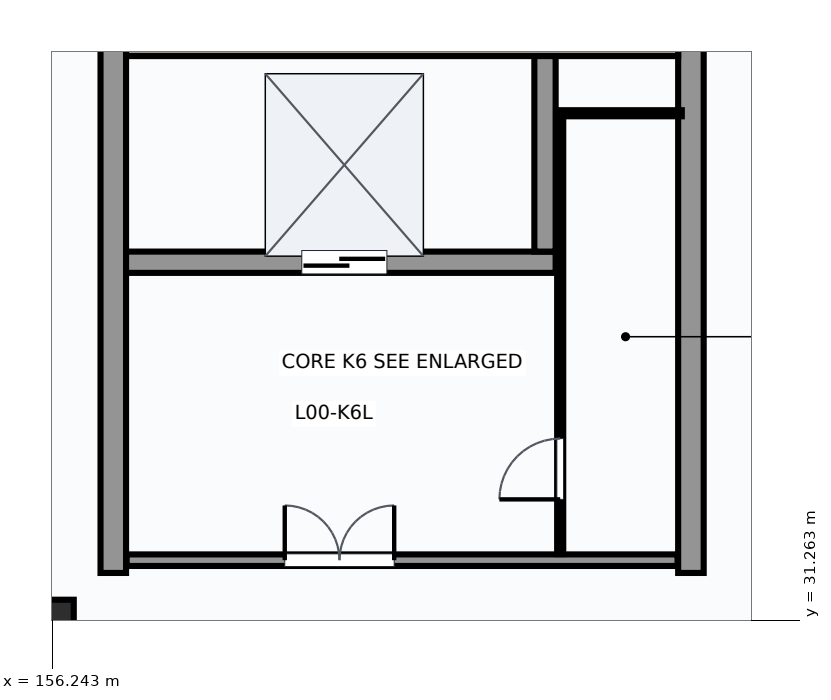
"""IFC4 building model, lengths in metres.
Left out: names, types, materials, properties, quantities, classifications, styles, units other than length and angle.
Written with IfcOpenShell. Run it as: python <this file> out.ifc"""

import sys

from ifc_helpers import new_model, si_unit, direction, frame, frame_2d, origin, origin_2d, place, context, subcontext, project, spatial, rectangle, extrude, element, fill, save


model = new_model("IFC4")
c1 = context("Model", 3, precision=1e-05, world=origin(), true_north=direction((0.0, 1.0)))
c2 = subcontext(c1, "Body", "Model", "MODEL_VIEW")
j1 = project(units=[si_unit("LENGTHUNIT", "METRE"), si_unit("PLANEANGLEUNIT", "RADIAN")], contexts=[c1])
p1 = place(None, origin())
s1 = spatial("IfcSite", under=j1, at=p1, CompositionType="ELEMENT")
p2 = place(p1, origin())
s2 = spatial("IfcBuilding", under=s1, at=p2, CompositionType="ELEMENT")
p3 = place(p2, origin())
s3 = spatial("IfcBuildingStorey", under=s2, at=p3, CompositionType="ELEMENT", Elevation=0.0)
p4 = place(p3, frame((156.0, 31.0, 0.0), z_axis=(0.0, 0.0, 1.0), x_axis=(1.0, 0.0, 0.0)))
e1 = element("IfcColumn", 1, at=p4, inside=s3, PredefinedType="COLUMN", context=c2, shape_type="SweptSolid", body=[
    extrude(rectangle(XDim=1.2, YDim=1.2, at=origin_2d()), origin(), (0.0, 0.0, 1.0), 5.4),
])
for number, where, z_axis, x_axis in (
    (2, (157.25, 32.04, 0.0), (0.0, 0.0, 1.0), (0.0, 1.0, 0.0)),
    (3, (166.75, 32.04, 0.0), (0.0, 0.0, 1.0), (0.0, 1.0, 0.0)),
):
    element("IfcWall", number, at=place(p3, frame(where, z_axis=z_axis, x_axis=x_axis)), inside=s3, PredefinedType="SHEAR", context=c2, shape_type="SweptSolid", body=[
        extrude(rectangle(XDim=8.92, YDim=0.42, at=frame_2d((4.46, 0.0))), origin(), (0.0, 0.0, 1.0), 5.4),
    ])
p5 = place(p3, frame((157.46, 40.75, 0.0), z_axis=(0.0, 0.0, 1.0), x_axis=(1.0, 0.0, 0.0)))
e4 = element("IfcWall", 4, at=p5, inside=s3, PredefinedType="SHEAR", context=c2, shape_type="SweptSolid", body=[
    extrude(rectangle(XDim=9.08, YDim=0.42, at=frame_2d((4.54, 0.0))), origin(), (0.0, 0.0, 1.0), 5.4),
])
p6 = place(p3, frame((157.46, 37.15, 0.0), z_axis=(0.0, 0.0, 1.0), x_axis=(1.0, 0.0, 0.0)))
e5 = element("IfcWall", 5, at=p6, inside=s3, PredefinedType="SHEAR", context=c2, shape_type="SweptSolid", body=[
    extrude(rectangle(XDim=7.065, YDim=0.35, at=frame_2d((3.532, 0.0))), origin(), (0.0, 0.0, 1.0), 5.4),
])
p7 = place(p6, frame((2.89, 0.0, 0.0)))
e6 = element("IfcOpeningElement", 6, at=p7, cuts=e5, PredefinedType="OPENING", context=c2, shape_type="SweptSolid", body=[
    extrude(rectangle(XDim=1.4, YDim=2.3, at=frame_2d((0.7, 1.15))), frame((0.0, 0.185, 0.0), z_axis=(0.0, -1.0, 0.0), x_axis=(1.0, 0.0, 0.0)), (0.0, 0.0, 1.0), 0.37),
])
p8 = place(p3, frame((164.35, 37.325, 0.0), z_axis=(0.0, 0.0, 1.0), x_axis=(0.0, 1.0, 0.0)))
e7 = element("IfcWall", 7, at=p8, inside=s3, PredefinedType="SHEAR", context=c2, shape_type="SweptSolid", body=[
    extrude(rectangle(XDim=3.215, YDim=0.35, at=frame_2d((1.607, 0.0))), origin(), (0.0, 0.0, 1.0), 5.4),
])
p9 = place(p3, frame((157.47, 32.25, 0.0), z_axis=(0.0, 0.0, 1.0), x_axis=(1.0, 0.0, 0.0)))
e8 = element("IfcWall", 8, at=p9, inside=s3, PredefinedType="PARTITIONING", context=c2, shape_type="SweptSolid", body=[
    extrude(rectangle(XDim=9.06, YDim=0.19, at=frame_2d((4.53, 0.0))), origin(), (0.0, 0.0, 1.0), 5.06),
])
p10 = place(p9, frame((2.6, 0.0, 0.0)))
e9 = element("IfcOpeningElement", 9, at=p10, cuts=e8, PredefinedType="OPENING", context=c2, shape_type="SweptSolid", body=[
    extrude(rectangle(XDim=1.8, YDim=2.3, at=frame_2d((0.9, 1.15))), frame((0.0, 0.105, 0.0), z_axis=(0.0, -1.0, 0.0), x_axis=(1.0, 0.0, 0.0)), (0.0, 0.0, 1.0), 0.21),
])
p11 = place(p3, frame((164.6, 32.35, 0.0), z_axis=(0.0, 0.0, 1.0), x_axis=(0.0, 1.0, 0.0)))
e10 = element("IfcWall", 10, at=p11, inside=s3, PredefinedType="PARTITIONING", context=c2, shape_type="SweptSolid", body=[
    extrude(rectangle(XDim=7.25, YDim=0.1, at=frame_2d((3.625, 0.0))), origin(), (0.0, 0.0, 1.0), 5.06),
])
p12 = place(p11, frame((0.9, 0.0, 0.0)))
e11 = element("IfcOpeningElement", 11, at=p12, cuts=e10, PredefinedType="OPENING", context=c2, shape_type="SweptSolid", body=[
    extrude(rectangle(XDim=1.0, YDim=2.1, at=frame_2d((0.5, 1.05))), frame((0.0, 0.06, 0.0), z_axis=(0.0, -1.0, 0.0), x_axis=(1.0, 0.0, 0.0)), (0.0, 0.0, 1.0), 0.12),
])
p13 = place(p3, frame((164.6, 39.6, 0.0), z_axis=(0.0, 0.0, 1.0), x_axis=(1.0, 0.0, 0.0)))
e12 = element("IfcWall", 12, at=p13, inside=s3, PredefinedType="PARTITIONING", context=c2, shape_type="SweptSolid", body=[
    extrude(rectangle(XDim=2.0, YDim=0.1, at=frame_2d((1.0, 0.0))), origin(), (0.0, 0.0, 1.0), 5.06),
])
p14 = place(p7, origin())
e13 = element("IfcDoor", 13, at=p14, inside=s3, OperationType="SLIDING_TO_LEFT", PredefinedType="DOOR", context=c2, shape_type="SweptSolid", body=[
    extrude(rectangle(XDim=1.4, YDim=2.3, at=frame_2d((0.7, 1.15))), frame((0.0, 0.025, 0.0), z_axis=(0.0, -1.0, 0.0), x_axis=(1.0, 0.0, 0.0)), (0.0, 0.0, 1.0), 0.05),
])
fill(e6, e13)
p15 = place(p10, origin())
e14 = element("IfcDoor", 14, at=p15, inside=s3, OperationType="DOUBLE_DOOR_SINGLE_SWING", PredefinedType="DOOR", context=c2, shape_type="SweptSolid", body=[
    extrude(rectangle(XDim=1.8, YDim=2.3, at=frame_2d((0.9, 1.15))), frame((0.0, 0.025, 0.0), z_axis=(0.0, -1.0, 0.0), x_axis=(1.0, 0.0, 0.0)), (0.0, 0.0, 1.0), 0.05),
])
fill(e9, e14)
p16 = place(p12, origin())
e15 = element("IfcDoor", 15, at=p16, inside=s3, OperationType="SINGLE_SWING_LEFT", PredefinedType="DOOR", context=c2, shape_type="SweptSolid", body=[
    extrude(rectangle(XDim=1.0, YDim=2.1, at=frame_2d((0.5, 1.05))), frame((0.0, 0.025, 0.0), z_axis=(0.0, -1.0, 0.0), x_axis=(1.0, 0.0, 0.0)), (0.0, 0.0, 1.0), 0.05),
])
fill(e11, e15)
save(model, sys.argv[1])
